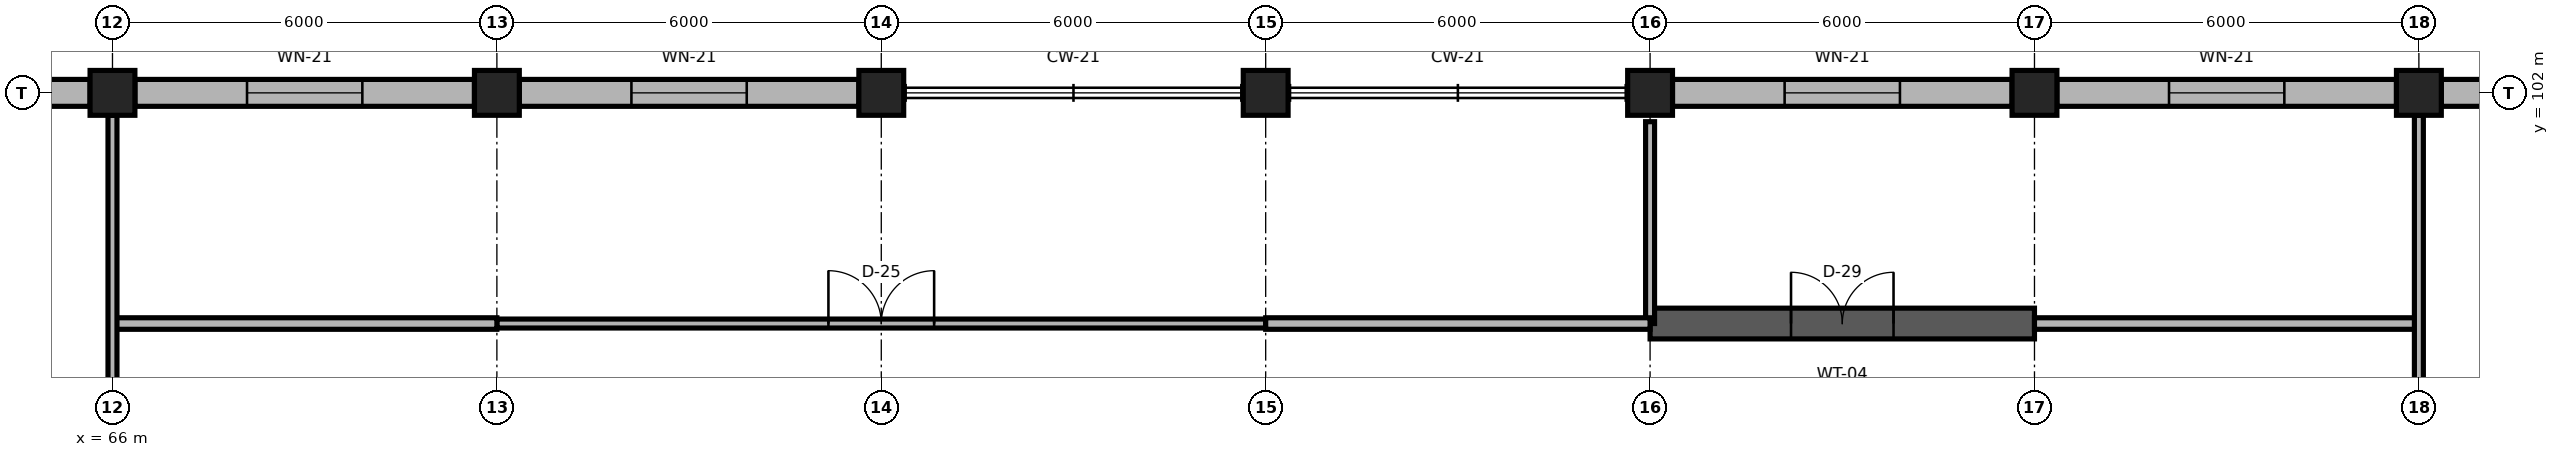
"""IFC4 building model, lengths in metres.
Left out: names, types, materials, properties, quantities, classifications, styles, units other than length and angle.
Written with IfcOpenShell. Run it as: python <this file> out.ifc"""

import sys

from ifc_helpers import new_model, si_unit, direction, frame, frame_2d, origin, origin_2d, place, context, subcontext, project, spatial, rectangle, extrude, element, fill, save


model = new_model("IFC4")
c1 = context("Model", 3, precision=1e-05, world=origin(), true_north=direction((0.0, 1.0)))
c2 = subcontext(c1, "Body", "Model", "MODEL_VIEW")
j1 = project(units=[si_unit("LENGTHUNIT", "METRE"), si_unit("PLANEANGLEUNIT", "RADIAN")], contexts=[c1])
p1 = place(None, origin())
s1 = spatial("IfcSite", under=j1, at=p1, CompositionType="ELEMENT")
p2 = place(p1, origin())
s2 = spatial("IfcBuilding", under=s1, at=p2, CompositionType="ELEMENT")
p3 = place(p2, frame((0.0, 0.0, 56.1)))
s3 = spatial("IfcBuildingStorey", under=s2, at=p3, CompositionType="ELEMENT", Elevation=56.1)
for number, where, z_axis, x_axis in (
    (1, (66.0, 102.0, 0.0), (0.0, 0.0, 1.0), (1.0, 0.0, 0.0)),
    (2, (72.0, 102.0, 0.0), (0.0, 0.0, 1.0), (1.0, 0.0, 0.0)),
    (3, (78.0, 102.0, 0.0), (0.0, 0.0, 1.0), (1.0, 0.0, 0.0)),
    (4, (84.0, 102.0, 0.0), (0.0, 0.0, 1.0), (1.0, 0.0, 0.0)),
    (5, (90.0, 102.0, 0.0), (0.0, 0.0, 1.0), (1.0, 0.0, 0.0)),
    (6, (96.0, 102.0, 0.0), (0.0, 0.0, 1.0), (1.0, 0.0, 0.0)),
    (7, (102.0, 102.0, 0.0), (0.0, 0.0, 1.0), (1.0, 0.0, 0.0)),
):
    element("IfcColumn", number, at=place(p3, frame(where, z_axis=z_axis, x_axis=x_axis)), inside=s3, PredefinedType="COLUMN", context=c2, shape_type="SweptSolid", body=[
        extrude(rectangle(XDim=0.7, YDim=0.7, at=origin_2d()), origin(), (0.0, 0.0, 1.0), 3.9),
    ])
p4 = place(p3, frame((60.35, 102.0, 0.0), z_axis=(0.0, 0.0, 1.0), x_axis=(1.0, 0.0, 0.0)))
e8 = element("IfcWall", 8, at=p4, inside=s3, PredefinedType="SOLIDWALL", context=c2, shape_type="SweptSolid", body=[
    extrude(rectangle(XDim=5.3, YDim=0.42, at=frame_2d((2.65, 0.0))), origin(), (0.0, 0.0, 1.0), 3.32),
])
p5 = place(p4, frame((1.75, 0.0, 0.85)))
e9 = element("IfcOpeningElement", 9, at=p5, cuts=e8, PredefinedType="OPENING", context=c2, shape_type="SweptSolid", body=[
    extrude(rectangle(XDim=1.8, YDim=1.95, at=frame_2d((0.9, 0.975))), frame((0.0, 0.225, 0.0), z_axis=(0.0, -1.0, 0.0), x_axis=(1.0, 0.0, 0.0)), (0.0, 0.0, 1.0), 0.45),
])
p6 = place(p3, frame((66.35, 102.0, 0.0), z_axis=(0.0, 0.0, 1.0), x_axis=(1.0, 0.0, 0.0)))
e10 = element("IfcWall", 10, at=p6, inside=s3, PredefinedType="SOLIDWALL", context=c2, shape_type="SweptSolid", body=[
    extrude(rectangle(XDim=5.3, YDim=0.42, at=frame_2d((2.65, 0.0))), origin(), (0.0, 0.0, 1.0), 3.32),
])
p7 = place(p6, frame((1.75, 0.0, 0.85)))
e11 = element("IfcOpeningElement", 11, at=p7, cuts=e10, PredefinedType="OPENING", context=c2, shape_type="SweptSolid", body=[
    extrude(rectangle(XDim=1.8, YDim=1.95, at=frame_2d((0.9, 0.975))), frame((0.0, 0.225, 0.0), z_axis=(0.0, -1.0, 0.0), x_axis=(1.0, 0.0, 0.0)), (0.0, 0.0, 1.0), 0.45),
])
p8 = place(p3, frame((72.35, 102.0, 0.0), z_axis=(0.0, 0.0, 1.0), x_axis=(1.0, 0.0, 0.0)))
e12 = element("IfcWall", 12, at=p8, inside=s3, PredefinedType="SOLIDWALL", context=c2, shape_type="SweptSolid", body=[
    extrude(rectangle(XDim=5.3, YDim=0.42, at=frame_2d((2.65, 0.0))), origin(), (0.0, 0.0, 1.0), 3.32),
])
p9 = place(p8, frame((1.75, 0.0, 0.85)))
e13 = element("IfcOpeningElement", 13, at=p9, cuts=e12, PredefinedType="OPENING", context=c2, shape_type="SweptSolid", body=[
    extrude(rectangle(XDim=1.8, YDim=1.95, at=frame_2d((0.9, 0.975))), frame((0.0, 0.225, 0.0), z_axis=(0.0, -1.0, 0.0), x_axis=(1.0, 0.0, 0.0)), (0.0, 0.0, 1.0), 0.45),
])
p10 = place(p3, frame((90.35, 102.0, 0.0), z_axis=(0.0, 0.0, 1.0), x_axis=(1.0, 0.0, 0.0)))
e14 = element("IfcWall", 14, at=p10, inside=s3, PredefinedType="SOLIDWALL", context=c2, shape_type="SweptSolid", body=[
    extrude(rectangle(XDim=5.3, YDim=0.42, at=frame_2d((2.65, 0.0))), origin(), (0.0, 0.0, 1.0), 3.32),
])
p11 = place(p10, frame((1.75, 0.0, 0.85)))
e15 = element("IfcOpeningElement", 15, at=p11, cuts=e14, PredefinedType="OPENING", context=c2, shape_type="SweptSolid", body=[
    extrude(rectangle(XDim=1.8, YDim=1.95, at=frame_2d((0.9, 0.975))), frame((0.0, 0.225, 0.0), z_axis=(0.0, -1.0, 0.0), x_axis=(1.0, 0.0, 0.0)), (0.0, 0.0, 1.0), 0.45),
])
p12 = place(p3, frame((96.35, 102.0, 0.0), z_axis=(0.0, 0.0, 1.0), x_axis=(1.0, 0.0, 0.0)))
e16 = element("IfcWall", 16, at=p12, inside=s3, PredefinedType="SOLIDWALL", context=c2, shape_type="SweptSolid", body=[
    extrude(rectangle(XDim=5.3, YDim=0.42, at=frame_2d((2.65, 0.0))), origin(), (0.0, 0.0, 1.0), 3.32),
])
p13 = place(p12, frame((1.75, 0.0, 0.85)))
e17 = element("IfcOpeningElement", 17, at=p13, cuts=e16, PredefinedType="OPENING", context=c2, shape_type="SweptSolid", body=[
    extrude(rectangle(XDim=1.8, YDim=1.95, at=frame_2d((0.9, 0.975))), frame((0.0, 0.225, 0.0), z_axis=(0.0, -1.0, 0.0), x_axis=(1.0, 0.0, 0.0)), (0.0, 0.0, 1.0), 0.45),
])
p14 = place(p3, frame((102.35, 102.0, 0.0), z_axis=(0.0, 0.0, 1.0), x_axis=(1.0, 0.0, 0.0)))
e18 = element("IfcWall", 18, at=p14, inside=s3, PredefinedType="SOLIDWALL", context=c2, shape_type="SweptSolid", body=[
    extrude(rectangle(XDim=5.3, YDim=0.42, at=frame_2d((2.65, 0.0))), origin(), (0.0, 0.0, 1.0), 3.32),
])
p15 = place(p14, frame((1.75, 0.0, 0.85)))
e19 = element("IfcOpeningElement", 19, at=p15, cuts=e18, PredefinedType="OPENING", context=c2, shape_type="SweptSolid", body=[
    extrude(rectangle(XDim=1.8, YDim=1.95, at=frame_2d((0.9, 0.975))), frame((0.0, 0.225, 0.0), z_axis=(0.0, -1.0, 0.0), x_axis=(1.0, 0.0, 0.0)), (0.0, 0.0, 1.0), 0.45),
])
p16 = place(p3, frame((72.0, 98.4, 0.0), z_axis=(0.0, 0.0, 1.0), x_axis=(1.0, 0.0, 0.0)))
e20 = element("IfcWall", 20, at=p16, inside=s3, PredefinedType="PARTITIONING", context=c2, shape_type="SweptSolid", body=[
    extrude(rectangle(XDim=12.0, YDim=0.14, at=frame_2d((6.0, 0.0))), origin(), (0.0, 0.0, 1.0), 3.74),
])
p17 = place(p16, frame((5.175, 0.0, 0.0)))
e21 = element("IfcOpeningElement", 21, at=p17, cuts=e20, PredefinedType="OPENING", context=c2, shape_type="SweptSolid", body=[
    extrude(rectangle(XDim=1.65, YDim=2.35, at=frame_2d((0.825, 1.175))), frame((0.0, 0.085, 0.0), z_axis=(0.0, -1.0, 0.0), x_axis=(1.0, 0.0, 0.0)), (0.0, 0.0, 1.0), 0.17),
])
p18 = place(p3, frame((90.0, 98.4, 0.0), z_axis=(0.0, 0.0, 1.0), x_axis=(1.0, 0.0, 0.0)))
e22 = element("IfcWall", 22, at=p18, inside=s3, PredefinedType="SHEAR", context=c2, shape_type="SweptSolid", body=[
    extrude(rectangle(XDim=6.0, YDim=0.48, at=frame_2d((3.0, 0.0))), origin(), (0.0, 0.0, 1.0), 3.74),
])
p19 = place(p18, frame((2.2, 0.0, 0.0)))
e23 = element("IfcOpeningElement", 23, at=p19, cuts=e22, PredefinedType="OPENING", context=c2, shape_type="SweptSolid", body=[
    extrude(rectangle(XDim=1.6, YDim=2.25, at=frame_2d((0.8, 1.125))), frame((0.0, 0.255, 0.0), z_axis=(0.0, -1.0, 0.0), x_axis=(1.0, 0.0, 0.0)), (0.0, 0.0, 1.0), 0.51),
])
p20 = place(p3, frame((90.0, 98.4, 0.0), z_axis=(0.0, 0.0, 1.0), x_axis=(0.0, 1.0, 0.0)))
e24 = element("IfcWall", 24, at=p20, inside=s3, PredefinedType="PARTITIONING", context=c2, shape_type="SweptSolid", body=[
    extrude(rectangle(XDim=3.15, YDim=0.14, at=frame_2d((1.575, 0.0))), origin(), (0.0, 0.0, 1.0), 3.449),
])
for number, where, z_axis, x_axis in (
    (25, (66.0, 98.4, 0.0), (0.0, 0.0, 1.0), (1.0, 0.0, 0.0)),
    (26, (84.0, 98.4, 0.0), (0.0, 0.0, 1.0), (1.0, 0.0, 0.0)),
    (27, (96.0, 98.4, 0.0), (0.0, 0.0, 1.0), (1.0, 0.0, 0.0)),
):
    element("IfcWall", number, at=place(p3, frame(where, z_axis=z_axis, x_axis=x_axis)), inside=s3, PredefinedType="PARTITIONING", context=c2, shape_type="SweptSolid", body=[
        extrude(rectangle(XDim=6.0, YDim=0.18, at=frame_2d((3.0, 0.0))), origin(), (0.0, 0.0, 1.0), 3.74),
    ])
for number, where, z_axis, x_axis in (
    (28, (66.0, 96.35, 0.0), (0.0, 0.0, 1.0), (0.0, 1.0, 0.0)),
    (29, (102.0, 96.35, 0.0), (0.0, 0.0, 1.0), (0.0, 1.0, 0.0)),
):
    element("IfcWall", number, at=place(p3, frame(where, z_axis=z_axis, x_axis=x_axis)), inside=s3, PredefinedType="PARTITIONING", context=c2, shape_type="SweptSolid", body=[
        extrude(rectangle(XDim=5.3, YDim=0.14, at=frame_2d((2.65, 0.0))), origin(), (0.0, 0.0, 1.0), 3.449),
    ])
p21 = place(p7, origin())
e30 = element("IfcWindow", 30, at=p21, inside=s3, PartitioningType="SINGLE_PANEL", PredefinedType="WINDOW", context=c2, shape_type="SweptSolid", body=[
    extrude(rectangle(XDim=1.8, YDim=1.95, at=frame_2d((0.9, 0.975))), frame((0.0, 0.03, 0.0), z_axis=(0.0, -1.0, 0.0), x_axis=(1.0, 0.0, 0.0)), (0.0, 0.0, 1.0), 0.06),
])
fill(e11, e30)
p22 = place(p9, origin())
e31 = element("IfcWindow", 31, at=p22, inside=s3, PartitioningType="SINGLE_PANEL", PredefinedType="WINDOW", context=c2, shape_type="SweptSolid", body=[
    extrude(rectangle(XDim=1.8, YDim=1.95, at=frame_2d((0.9, 0.975))), frame((0.0, 0.03, 0.0), z_axis=(0.0, -1.0, 0.0), x_axis=(1.0, 0.0, 0.0)), (0.0, 0.0, 1.0), 0.06),
])
fill(e13, e31)
p23 = place(p11, origin())
e32 = element("IfcWindow", 32, at=p23, inside=s3, PartitioningType="SINGLE_PANEL", PredefinedType="WINDOW", context=c2, shape_type="SweptSolid", body=[
    extrude(rectangle(XDim=1.8, YDim=1.95, at=frame_2d((0.9, 0.975))), frame((0.0, 0.03, 0.0), z_axis=(0.0, -1.0, 0.0), x_axis=(1.0, 0.0, 0.0)), (0.0, 0.0, 1.0), 0.06),
])
fill(e15, e32)
p24 = place(p13, origin())
e33 = element("IfcWindow", 33, at=p24, inside=s3, PartitioningType="SINGLE_PANEL", PredefinedType="WINDOW", context=c2, shape_type="SweptSolid", body=[
    extrude(rectangle(XDim=1.8, YDim=1.95, at=frame_2d((0.9, 0.975))), frame((0.0, 0.03, 0.0), z_axis=(0.0, -1.0, 0.0), x_axis=(1.0, 0.0, 0.0)), (0.0, 0.0, 1.0), 0.06),
])
fill(e17, e33)
p25 = place(p17, origin())
e34 = element("IfcDoor", 34, at=p25, inside=s3, OperationType="DOUBLE_DOOR_SINGLE_SWING", PredefinedType="DOOR", context=c2, shape_type="SweptSolid", body=[
    extrude(rectangle(XDim=1.65, YDim=2.35, at=frame_2d((0.825, 1.175))), frame((0.0, 0.025, 0.0), z_axis=(0.0, -1.0, 0.0), x_axis=(1.0, 0.0, 0.0)), (0.0, 0.0, 1.0), 0.05),
])
fill(e21, e34)
p26 = place(p19, origin())
e35 = element("IfcDoor", 35, at=p26, inside=s3, OperationType="DOUBLE_DOOR_SINGLE_SWING", PredefinedType="DOOR", context=c2, shape_type="SweptSolid", body=[
    extrude(rectangle(XDim=1.6, YDim=2.25, at=frame_2d((0.8, 1.125))), frame((0.0, 0.025, 0.0), z_axis=(0.0, -1.0, 0.0), x_axis=(1.0, 0.0, 0.0)), (0.0, 0.0, 1.0), 0.05),
])
fill(e23, e35)
save(model, sys.argv[1])
